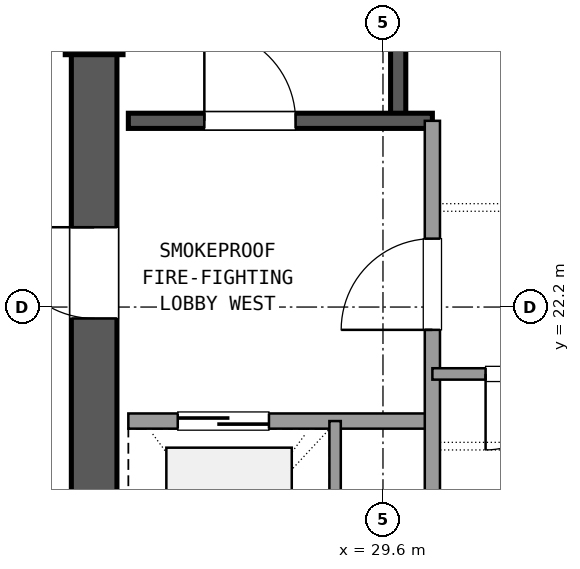
"""IFC4 building model, lengths in metres.
Left out: names, types, materials, properties, quantities, classifications, styles, units other than length and angle.
Written with IfcOpenShell. Run it as: python <this file> out.ifc"""

import sys

from ifc_helpers import new_model, si_unit, direction, frame, frame_2d, origin, origin_2d, place, context, subcontext, project, spatial, rectangle, extrude, element, fill, save


model = new_model("IFC4")
c1 = context("Model", 3, precision=1e-05, world=origin(), true_north=direction((0.0, 1.0)))
c2 = subcontext(c1, "Body", "Model", "MODEL_VIEW")
j1 = project(units=[si_unit("LENGTHUNIT", "METRE"), si_unit("PLANEANGLEUNIT", "RADIAN")], contexts=[c1])
p1 = place(None, origin())
s1 = spatial("IfcSite", under=j1, at=p1, CompositionType="ELEMENT")
p2 = place(p1, origin())
s2 = spatial("IfcBuilding", under=s1, at=p2, CompositionType="ELEMENT")
p3 = place(p2, frame((0.0, 0.0, 271.62)))
s3 = spatial("IfcBuildingStorey", under=s2, at=p3, CompositionType="ELEMENT", Elevation=271.62)
p4 = place(p3, frame((25.8, 25.9, 0.0), z_axis=(0.0, 0.0, 1.0), x_axis=(1.0, 0.0, 0.0)))
e1 = element("IfcColumn", 1, at=p4, inside=s3, PredefinedType="COLUMN", context=c2, shape_type="SweptSolid", body=[
    extrude(rectangle(XDim=0.76, YDim=0.76, at=origin_2d()), origin(), (0.0, 0.0, 1.0), 3.6),
])
p5 = place(p3, frame((25.8, 25.525, 0.0), z_axis=(0.0, 0.0, 1.0), x_axis=(0.0, -1.0, 0.0)))
e2 = element("IfcWall", 2, at=p5, inside=s3, PredefinedType="SHEAR", context=c2, shape_type="SweptSolid", body=[
    extrude(rectangle(XDim=7.85, YDim=0.6, at=frame_2d((3.925, 0.0))), origin(), (0.0, 0.0, 1.0), 3.32),
])
p6 = place(p5, frame((2.275, 0.0, 0.0)))
e3 = element("IfcOpeningElement", 3, at=p6, cuts=e2, PredefinedType="OPENING", context=c2, shape_type="SweptSolid", body=[
    extrude(rectangle(XDim=1.2, YDim=2.15, at=frame_2d((0.6, 1.075))), frame((0.0, 0.31, 0.0), z_axis=(0.0, -1.0, 0.0), x_axis=(1.0, 0.0, 0.0)), (0.0, 0.0, 1.0), 0.62),
])
p7 = place(p3, frame((29.8, 24.65, 0.0), z_axis=(0.0, 0.0, 1.0), x_axis=(0.0, 1.0, 0.0)))
e4 = element("IfcWall", 4, at=p7, inside=s3, PredefinedType="SHEAR", context=c2, shape_type="SweptSolid", body=[
    extrude(rectangle(XDim=9.4, YDim=0.2, at=frame_2d((4.7, 0.0))), origin(), (0.0, 0.0, 1.0), 3.32),
])
p8 = place(p3, frame((26.25, 24.65, 0.0), z_axis=(0.0, 0.0, 1.0), x_axis=(1.0, 0.0, 0.0)))
e5 = element("IfcWall", 5, at=p8, inside=s3, PredefinedType="SHEAR", context=c2, shape_type="SweptSolid", body=[
    extrude(rectangle(XDim=4.0, YDim=0.2, at=frame_2d((2.0, 0.0))), origin(), (0.0, 0.0, 1.0), 3.32),
])
p9 = place(p8, frame((1.0, 0.0, 0.0)))
e6 = element("IfcOpeningElement", 6, at=p9, cuts=e5, PredefinedType="OPENING", context=c2, shape_type="SweptSolid", body=[
    extrude(rectangle(XDim=1.2, YDim=2.15, at=frame_2d((0.6, 1.075))), frame((0.0, 0.11, 0.0), z_axis=(0.0, -1.0, 0.0), x_axis=(1.0, 0.0, 0.0)), (0.0, 0.0, 1.0), 0.22),
])
p10 = place(p3, frame((26.25, 20.7, 0.0), z_axis=(0.0, 0.0, 1.0), x_axis=(1.0, 0.0, 0.0)))
e7 = element("IfcWall", 7, at=p10, inside=s3, PredefinedType="SOLIDWALL", context=c2, shape_type="SweptSolid", body=[
    extrude(rectangle(XDim=4.0, YDim=0.2, at=frame_2d((2.0, 0.0))), origin(), (0.0, 0.0, 1.0), 2.61),
])
p11 = place(p10, frame((0.65, 0.0, 0.0)))
e8 = element("IfcOpeningElement", 8, at=p11, cuts=e7, PredefinedType="OPENING", context=c2, shape_type="SweptSolid", body=[
    extrude(rectangle(XDim=1.2, YDim=2.15, at=frame_2d((0.6, 1.075))), frame((0.0, 0.11, 0.0), z_axis=(0.0, -1.0, 0.0), x_axis=(1.0, 0.0, 0.0)), (0.0, 0.0, 1.0), 0.22),
])
p12 = place(p3, frame((30.25, 17.75, 0.0), z_axis=(0.0, 0.0, 1.0), x_axis=(0.0, 1.0, 0.0)))
e9 = element("IfcWall", 9, at=p12, inside=s3, PredefinedType="SOLIDWALL", context=c2, shape_type="SweptSolid", body=[
    extrude(rectangle(XDim=6.9, YDim=0.2, at=frame_2d((3.45, 0.0))), origin(), (0.0, 0.0, 1.0), 2.61),
])
p13 = place(p12, frame((4.15, 0.0, 0.0)))
e10 = element("IfcOpeningElement", 10, at=p13, cuts=e9, PredefinedType="OPENING", context=c2, shape_type="SweptSolid", body=[
    extrude(rectangle(XDim=1.2, YDim=2.15, at=frame_2d((0.6, 1.075))), frame((0.0, 0.11, 0.0), z_axis=(0.0, -1.0, 0.0), x_axis=(1.0, 0.0, 0.0)), (0.0, 0.0, 1.0), 0.22),
])
p14 = place(p3, frame((28.97, 17.75, 0.0), z_axis=(0.0, 0.0, 1.0), x_axis=(0.0, 1.0, 0.0)))
e11 = element("IfcWall", 11, at=p14, inside=s3, PredefinedType="PARTITIONING", context=c2, shape_type="SweptSolid", body=[
    extrude(rectangle(XDim=2.95, YDim=0.15, at=frame_2d((1.475, 0.0))), origin(), (0.0, 0.0, 1.0), 2.61),
])
p15 = place(p3, frame((30.25, 21.32, 0.0), z_axis=(0.0, 0.0, 1.0), x_axis=(1.0, 0.0, 0.0)))
e12 = element("IfcWall", 12, at=p15, inside=s3, PredefinedType="PARTITIONING", context=c2, shape_type="SweptSolid", body=[
    extrude(rectangle(XDim=7.0, YDim=0.15, at=frame_2d((3.5, 0.0))), origin(), (0.0, 0.0, 1.0), 2.61),
])
p16 = place(p15, frame((0.7, 0.0, 0.0)))
e13 = element("IfcOpeningElement", 13, at=p16, cuts=e12, PredefinedType="OPENING", context=c2, shape_type="SweptSolid", body=[
    extrude(rectangle(XDim=1.0, YDim=2.15, at=frame_2d((0.5, 1.075))), frame((0.0, 0.085, 0.0), z_axis=(0.0, -1.0, 0.0), x_axis=(1.0, 0.0, 0.0)), (0.0, 0.0, 1.0), 0.17),
])
p17 = place(p15, frame((4.85, 0.0, 0.0)))
e14 = element("IfcOpeningElement", 14, at=p17, cuts=e12, PredefinedType="OPENING", context=c2, shape_type="SweptSolid", body=[
    extrude(rectangle(XDim=1.0, YDim=2.15, at=frame_2d((0.5, 1.075))), frame((0.0, 0.085, 0.0), z_axis=(0.0, -1.0, 0.0), x_axis=(1.0, 0.0, 0.0)), (0.0, 0.0, 1.0), 0.17),
])
p18 = place(p9, origin())
e15 = element("IfcDoor", 15, at=p18, inside=s3, OperationType="SINGLE_SWING_LEFT", PredefinedType="DOOR", context=c2, shape_type="SweptSolid", body=[
    extrude(rectangle(XDim=1.2, YDim=2.15, at=frame_2d((0.6, 1.075))), frame((0.0, 0.025, 0.0), z_axis=(0.0, -1.0, 0.0), x_axis=(1.0, 0.0, 0.0)), (0.0, 0.0, 1.0), 0.05),
])
fill(e6, e15)
p19 = place(p11, origin())
e16 = element("IfcDoor", 16, at=p19, inside=s3, OperationType="SLIDING_TO_LEFT", PredefinedType="DOOR", context=c2, shape_type="SweptSolid", body=[
    extrude(rectangle(XDim=1.2, YDim=2.15, at=frame_2d((0.6, 1.075))), frame((0.0, 0.025, 0.0), z_axis=(0.0, -1.0, 0.0), x_axis=(1.0, 0.0, 0.0)), (0.0, 0.0, 1.0), 0.05),
])
fill(e8, e16)
p20 = place(p13, origin())
e17 = element("IfcDoor", 17, at=p20, inside=s3, OperationType="SINGLE_SWING_LEFT", PredefinedType="DOOR", context=c2, shape_type="SweptSolid", body=[
    extrude(rectangle(XDim=1.2, YDim=2.15, at=frame_2d((0.6, 1.075))), frame((0.0, 0.025, 0.0), z_axis=(0.0, -1.0, 0.0), x_axis=(1.0, 0.0, 0.0)), (0.0, 0.0, 1.0), 0.05),
])
fill(e10, e17)
p21 = place(p6, frame((1.2, 0.0, 0.0), z_axis=(0.0, 0.0, 1.0), x_axis=(-1.0, 0.0, 0.0)))
e18 = element("IfcDoor", 18, at=p21, inside=s3, OperationType="SINGLE_SWING_LEFT", PredefinedType="DOOR", context=c2, shape_type="SweptSolid", body=[
    extrude(rectangle(XDim=1.2, YDim=2.15, at=frame_2d((0.6, 1.075))), frame((0.0, 0.025, 0.0), z_axis=(0.0, -1.0, 0.0), x_axis=(1.0, 0.0, 0.0)), (0.0, 0.0, 1.0), 0.05),
])
fill(e3, e18)
p22 = place(p16, frame((1.0, 0.0, 0.0), z_axis=(0.0, 0.0, 1.0), x_axis=(-1.0, 0.0, 0.0)))
e19 = element("IfcDoor", 19, at=p22, inside=s3, OperationType="SINGLE_SWING_LEFT", PredefinedType="DOOR", context=c2, shape_type="SweptSolid", body=[
    extrude(rectangle(XDim=1.0, YDim=2.15, at=frame_2d((0.5, 1.075))), frame((0.0, 0.025, 0.0), z_axis=(0.0, -1.0, 0.0), x_axis=(1.0, 0.0, 0.0)), (0.0, 0.0, 1.0), 0.05),
])
fill(e13, e19)
save(model, sys.argv[1])
